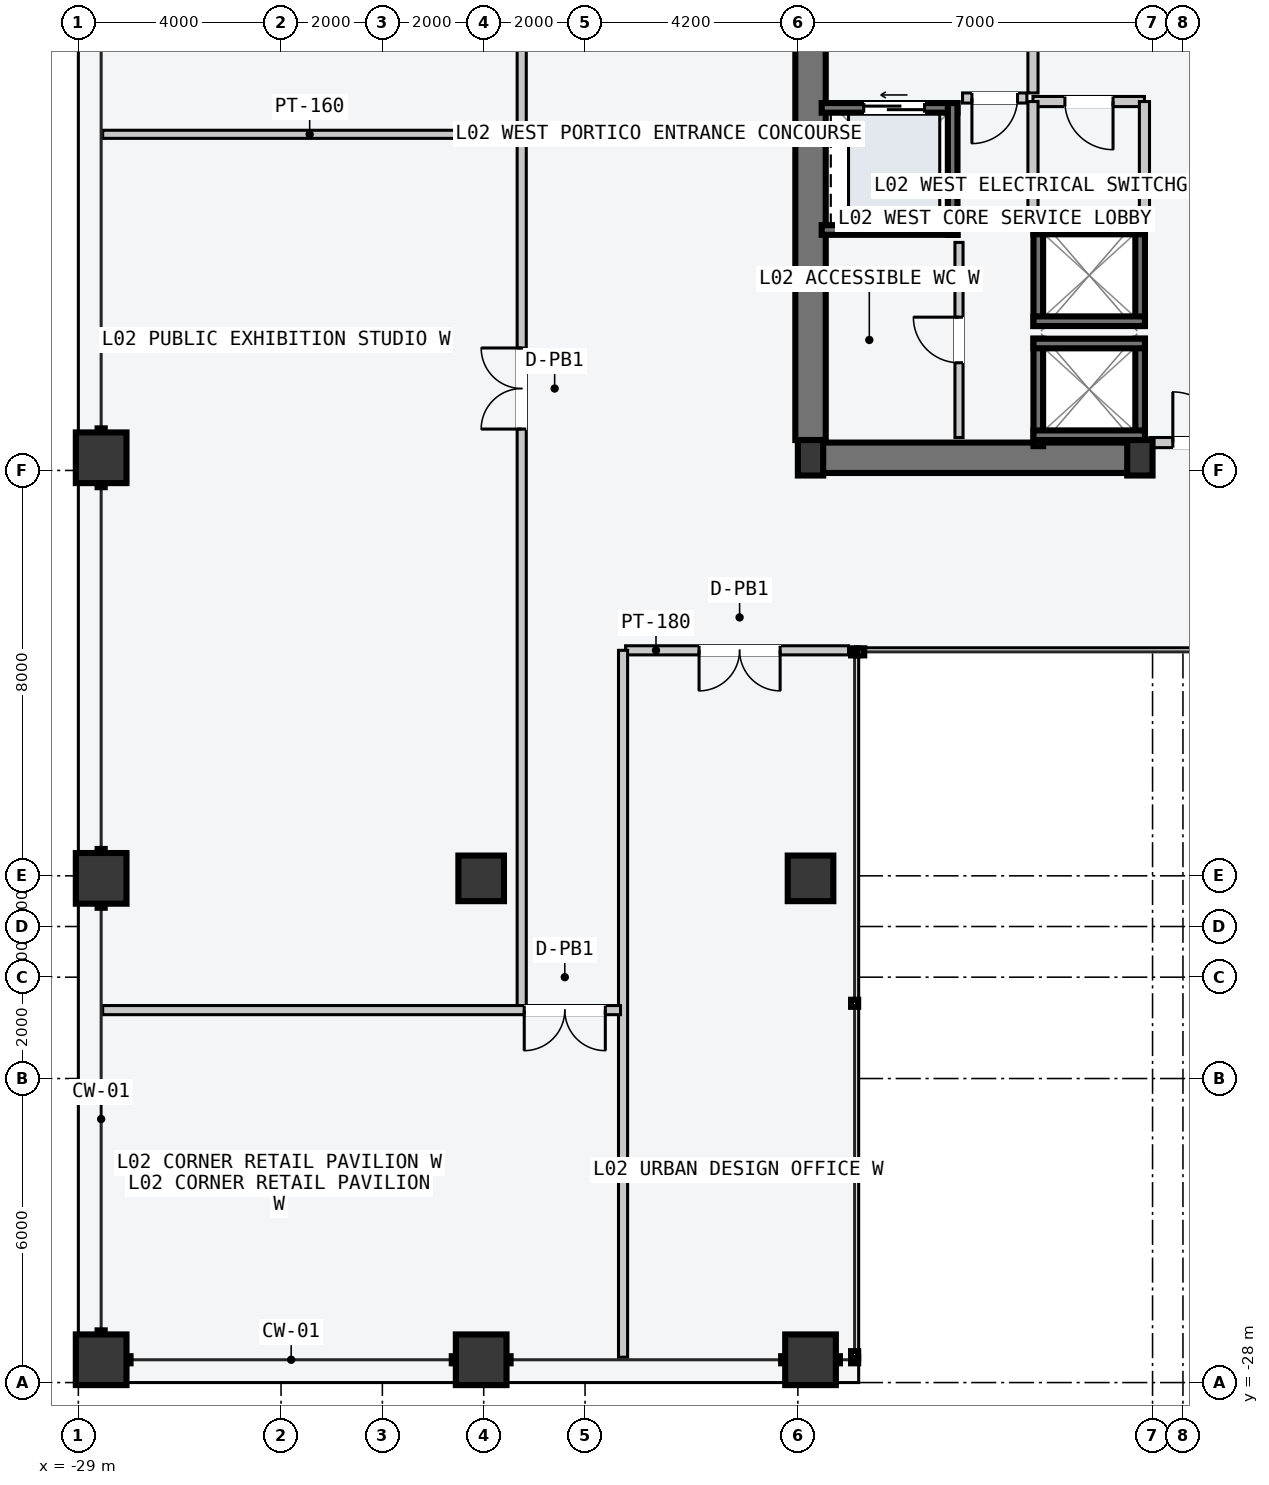
"""IFC4 building model, lengths in metres.
Left out: names, types, materials, properties, quantities, classifications, styles, units other than length and angle.
Written with IfcOpenShell. Run it as: python <this file> out.ifc"""

import sys

from ifc_helpers import new_model, si_unit, direction, frame, frame_2d, origin, origin_2d, place, context, subcontext, project, spatial, rectangle, hollow_rectangle, i_section, extrude, element, fill, save


model = new_model("IFC4")
c1 = context("Model", 3, precision=1e-05, world=origin(), true_north=direction((0.0, 1.0)))
c2 = subcontext(c1, "Body", "Model", "MODEL_VIEW")
j1 = project(units=[si_unit("LENGTHUNIT", "METRE"), si_unit("PLANEANGLEUNIT", "RADIAN")], contexts=[c1])
p1 = place(None, origin())
s1 = spatial("IfcSite", under=j1, at=p1, CompositionType="ELEMENT")
p2 = place(p1, origin())
s2 = spatial("IfcBuilding", under=s1, at=p2, CompositionType="ELEMENT")
p3 = place(p2, frame((0.0, 0.0, 9.6)))
s3 = spatial("IfcBuildingStorey", under=s2, at=p3, CompositionType="ELEMENT", Elevation=9.6)
p4 = place(p3, frame((-14.53, -9.75, -0.22), z_axis=(0.0, 0.0, 1.0), x_axis=(1.0, 0.0, 0.0)))
e1 = element("IfcWall", 1, at=p4, inside=s3, PredefinedType="SHEAR", context=c2, shape_type="SweptSolid", body=[
    extrude(rectangle(XDim=6.46, YDim=0.6, at=frame_2d((3.23, 0.0))), origin(), (0.0, 0.0, 1.0), 4.8),
])
p5 = place(p3, frame((-14.55, -9.4, -0.22), z_axis=(0.0, 0.0, 1.0), x_axis=(0.0, 1.0, 0.0)))
e2 = element("IfcWall", 2, at=p5, inside=s3, PredefinedType="SHEAR", context=c2, shape_type="SweptSolid", body=[
    extrude(rectangle(XDim=9.05, YDim=0.6, at=frame_2d((4.525, 0.0))), origin(), (0.0, 0.0, 1.0), 4.8),
])
for number, where, z_axis, x_axis in (
    (3, (-14.55, -9.75, 0.0), (0.0, 0.0, 1.0), (1.0, 0.0, 0.0)),
    (4, (-8.05, -9.75, 0.0), (0.0, 0.0, 1.0), (1.0, 0.0, 0.0)),
):
    element("IfcColumn", number, at=place(p3, frame(where, z_axis=z_axis, x_axis=x_axis)), inside=s3, PredefinedType="COLUMN", context=c2, shape_type="SweptSolid", body=[
        extrude(i_section(OverallWidth=0.5, OverallDepth=0.7, WebThickness=0.028, FlangeThickness=0.045, at=origin_2d()), origin(), (0.0, 0.0, 1.0), 4.8),
    ])
for number, where, z_axis, x_axis in (
    (5, (-21.05, -18.05, 0.0), (0.0, 0.0, 1.0), (1.0, 0.0, 0.0)),
    (6, (-14.55, -18.05, 0.0), (0.0, 0.0, 1.0), (1.0, 0.0, 0.0)),
):
    element("IfcColumn", number, at=place(p3, frame(where, z_axis=z_axis, x_axis=x_axis)), inside=s3, PredefinedType="COLUMN", context=c2, shape_type="SweptSolid", body=[
        extrude(hollow_rectangle(XDim=0.9, YDim=0.9, WallThickness=0.045, at=origin_2d()), origin(), (0.0, 0.0, 1.0), 4.8),
    ])
for number, where, z_axis, x_axis in (
    (7, (-28.55, -27.55, 0.0), (0.0, 0.0, 1.0), (1.0, 0.0, 0.0)),
    (8, (-21.05, -27.55, 0.0), (0.0, 0.0, 1.0), (1.0, 0.0, 0.0)),
    (9, (-14.55, -27.55, 0.0), (0.0, 0.0, 1.0), (1.0, 0.0, 0.0)),
    (10, (-28.55, -18.05, 0.0), (0.0, 0.0, 1.0), (0.0, 1.0, 0.0)),
    (11, (-28.55, -9.75, 0.0), (0.0, 0.0, 1.0), (0.0, 1.0, 0.0)),
):
    element("IfcColumn", number, at=place(p3, frame(where, z_axis=z_axis, x_axis=x_axis)), inside=s3, PredefinedType="COLUMN", context=c2, shape_type="SweptSolid", body=[
        extrude(hollow_rectangle(XDim=1.0, YDim=1.0, WallThickness=0.05, at=origin_2d()), origin(), (0.0, 0.0, 1.0), 4.8),
    ])
for number, where, z_axis, x_axis in (
    (12, (-8.045, -9.52, -0.22), (0.0, 0.0, 1.0), (0.0, 1.0, 0.0)),
    (13, (-10.055, -9.52, -0.22), (0.0, 0.0, 1.0), (0.0, 1.0, 0.0)),
):
    element("IfcWall", number, at=place(p3, frame(where, z_axis=z_axis, x_axis=x_axis)), inside=s3, PredefinedType="SOLIDWALL", context=c2, shape_type="SweptSolid", body=[
        extrude(rectangle(XDim=2.12, YDim=0.19, at=frame_2d((1.06, 0.0))), origin(), (0.0, 0.0, 1.0), 4.8),
    ])
for number, where, z_axis, x_axis in (
    (14, (-10.15, -7.495, -0.22), (0.0, 0.0, 1.0), (1.0, 0.0, 0.0)),
    (15, (-10.15, -9.305, -0.22), (0.0, 0.0, 1.0), (1.0, 0.0, 0.0)),
):
    element("IfcWall", number, at=place(p3, frame(where, z_axis=z_axis, x_axis=x_axis)), inside=s3, PredefinedType="SOLIDWALL", context=c2, shape_type="SweptSolid", body=[
        extrude(rectangle(XDim=2.2, YDim=0.19, at=frame_2d((1.1, 0.0))), origin(), (0.0, 0.0, 1.0), 4.8),
    ])
for number, where, z_axis, x_axis in (
    (16, (-8.045, -7.15, -0.22), (0.0, 0.0, 1.0), (0.0, 1.0, 0.0)),
    (17, (-10.055, -7.15, -0.22), (0.0, 0.0, 1.0), (0.0, 1.0, 0.0)),
):
    element("IfcWall", number, at=place(p3, frame(where, z_axis=z_axis, x_axis=x_axis)), inside=s3, PredefinedType="SOLIDWALL", context=c2, shape_type="SweptSolid", body=[
        extrude(rectangle(XDim=2.0, YDim=0.19, at=frame_2d((1.0, 0.0))), origin(), (0.0, 0.0, 1.0), 4.8),
    ])
for number, where, z_axis, x_axis in (
    (18, (-10.15, -5.245, -0.22), (0.0, 0.0, 1.0), (1.0, 0.0, 0.0)),
    (19, (-10.15, -7.055, -0.22), (0.0, 0.0, 1.0), (1.0, 0.0, 0.0)),
):
    element("IfcWall", number, at=place(p3, frame(where, z_axis=z_axis, x_axis=x_axis)), inside=s3, PredefinedType="SOLIDWALL", context=c2, shape_type="SweptSolid", body=[
        extrude(rectangle(XDim=2.2, YDim=0.19, at=frame_2d((1.1, 0.0))), origin(), (0.0, 0.0, 1.0), 4.8),
    ])
p6 = place(p3, frame((-14.33, -2.845, -0.22), z_axis=(0.0, 0.0, 1.0), x_axis=(1.0, 0.0, 0.0)))
e20 = element("IfcWall", 20, at=p6, inside=s3, PredefinedType="SOLIDWALL", context=c2, shape_type="SweptSolid", body=[
    extrude(rectangle(XDim=2.68, YDim=0.19, at=frame_2d((1.34, 0.0))), origin(), (0.0, 0.0, 1.0), 4.8),
])
p7 = place(p6, frame((0.83, 0.0, 0.22)))
e21 = element("IfcOpeningElement", 21, at=p7, cuts=e20, PredefinedType="OPENING", context=c2, shape_type="SweptSolid", body=[
    extrude(rectangle(XDim=1.2, YDim=2.2, at=frame_2d((0.6, 1.1))), frame((0.0, 0.105, 0.0), z_axis=(0.0, -1.0, 0.0), x_axis=(1.0, 0.0, 0.0)), (0.0, 0.0, 1.0), 0.21),
])
p8 = place(p3, frame((-14.33, -5.255, -0.22), z_axis=(0.0, 0.0, 1.0), x_axis=(1.0, 0.0, 0.0)))
e22 = element("IfcWall", 22, at=p8, inside=s3, PredefinedType="SOLIDWALL", context=c2, shape_type="SweptSolid", body=[
    extrude(rectangle(XDim=2.68, YDim=0.19, at=frame_2d((1.34, 0.0))), origin(), (0.0, 0.0, 1.0), 4.8),
])
p9 = place(p3, frame((-11.745, -5.35, -0.22), z_axis=(0.0, 0.0, 1.0), x_axis=(0.0, 1.0, 0.0)))
e23 = element("IfcWall", 23, at=p9, inside=s3, PredefinedType="SOLIDWALL", context=c2, shape_type="SweptSolid", body=[
    extrude(rectangle(XDim=2.6, YDim=0.19, at=frame_2d((1.3, 0.0))), origin(), (0.0, 0.0, 1.0), 4.8),
])
p10 = place(p3, frame((-10.16, -2.55, 0.0), z_axis=(0.0, 0.0, 1.0), x_axis=(0.0, 1.0, 0.0)))
e24 = element("IfcWall", 24, at=p10, inside=s3, PredefinedType="PARTITIONING", context=c2, shape_type="SweptSolid", body=[
    extrude(rectangle(XDim=3.4, YDim=0.2, at=frame_2d((1.7, 0.0))), origin(), (0.0, 0.0, 1.0), 4.58),
])
p11 = place(p10, frame((1.3, 0.0, 0.0)))
e25 = element("IfcOpeningElement", 25, at=p11, cuts=e24, PredefinedType="OPENING", context=c2, shape_type="SweptSolid", body=[
    extrude(rectangle(XDim=1.1, YDim=2.15, at=frame_2d((0.55, 1.075))), frame((0.0, 0.11, 0.0), z_axis=(0.0, -1.0, 0.0), x_axis=(1.0, 0.0, 0.0)), (0.0, 0.0, 1.0), 0.22),
])
p12 = place(p3, frame((-10.28, -2.65, 0.0), z_axis=(0.0, 0.0, 1.0), x_axis=(-1.0, 0.0, 0.0)))
e26 = element("IfcWall", 26, at=p12, inside=s3, PredefinedType="PARTITIONING", context=c2, shape_type="SweptSolid", body=[
    extrude(rectangle(XDim=1.27, YDim=0.2, at=frame_2d((0.635, 0.0))), origin(), (0.0, 0.0, 1.0), 4.58),
])
p13 = place(p12, frame((0.185, 0.0, 0.0)))
e27 = element("IfcOpeningElement", 27, at=p13, cuts=e26, PredefinedType="OPENING", context=c2, shape_type="SweptSolid", body=[
    extrude(rectangle(XDim=0.9, YDim=2.15, at=frame_2d((0.45, 1.075))), frame((0.0, 0.11, 0.0), z_axis=(0.0, -1.0, 0.0), x_axis=(1.0, 0.0, 0.0)), (0.0, 0.0, 1.0), 0.22),
])
p14 = place(p3, frame((-7.96, -2.72, 0.0), z_axis=(0.0, 0.0, 1.0), x_axis=(-1.0, 0.0, 0.0)))
e28 = element("IfcWall", 28, at=p14, inside=s3, PredefinedType="PARTITIONING", context=c2, shape_type="SweptSolid", body=[
    extrude(rectangle(XDim=2.2, YDim=0.2, at=frame_2d((1.1, 0.0))), origin(), (0.0, 0.0, 1.0), 4.58),
])
p15 = place(p14, frame((0.62, 0.0, 0.0)))
e29 = element("IfcOpeningElement", 29, at=p15, cuts=e28, PredefinedType="OPENING", context=c2, shape_type="SweptSolid", body=[
    extrude(rectangle(XDim=0.95, YDim=2.1, at=frame_2d((0.475, 1.05))), frame((0.0, 0.11, 0.0), z_axis=(0.0, -1.0, 0.0), x_axis=(1.0, 0.0, 0.0)), (0.0, 0.0, 1.0), 0.22),
])
for number, where, z_axis, x_axis in (
    (30, (-7.96, -5.16, 0.0), (0.0, 0.0, 1.0), (0.0, 1.0, 0.0)),
    (31, (-10.16, -5.16, 0.0), (0.0, 0.0, 1.0), (0.0, 1.0, 0.0)),
):
    element("IfcWall", number, at=place(p3, frame(where, z_axis=z_axis, x_axis=x_axis)), inside=s3, PredefinedType="PARTITIONING", context=c2, shape_type="SweptSolid", body=[
        extrude(rectangle(XDim=2.44, YDim=0.2, at=frame_2d((1.22, 0.0))), origin(), (0.0, 0.0, 1.0), 4.58),
    ])
p16 = place(p3, frame((-11.62, -9.35, 0.0), z_axis=(0.0, 0.0, 1.0), x_axis=(0.0, 1.0, 0.0)))
e32 = element("IfcWall", 32, at=p16, inside=s3, PredefinedType="PARTITIONING", context=c2, shape_type="SweptSolid", body=[
    extrude(rectangle(XDim=3.85, YDim=0.16, at=frame_2d((1.925, 0.0))), origin(), (0.0, 0.0, 1.0), 4.58),
])
p17 = place(p16, frame((1.475, 0.0, 0.0)))
e33 = element("IfcOpeningElement", 33, at=p17, cuts=e32, PredefinedType="OPENING", context=c2, shape_type="SweptSolid", body=[
    extrude(rectangle(XDim=0.9, YDim=2.15, at=frame_2d((0.45, 1.075))), frame((0.0, 0.09, 0.0), z_axis=(0.0, -1.0, 0.0), x_axis=(1.0, 0.0, 0.0)), (0.0, 0.0, 1.0), 0.18),
])
p18 = place(p3, frame((-7.85, -9.45, 0.0), z_axis=(0.0, 0.0, 1.0), x_axis=(1.0, 0.0, 0.0)))
e34 = element("IfcWall", 34, at=p18, inside=s3, PredefinedType="PARTITIONING", context=c2, shape_type="SweptSolid", body=[
    extrude(rectangle(XDim=1.93, YDim=0.2, at=frame_2d((0.965, 0.0))), origin(), (0.0, 0.0, 1.0), 2.63),
])
p19 = place(p18, frame((0.45, 0.0, 0.0)))
e35 = element("IfcOpeningElement", 35, at=p19, cuts=e34, PredefinedType="OPENING", context=c2, shape_type="SweptSolid", body=[
    extrude(rectangle(XDim=1.0, YDim=2.15, at=frame_2d((0.5, 1.075))), frame((0.0, 0.11, 0.0), z_axis=(0.0, -1.0, 0.0), x_axis=(1.0, 0.0, 0.0)), (0.0, 0.0, 1.0), 0.22),
])
p20 = place(p3, frame((-20.35, -3.367, 0.0), z_axis=(0.0, 0.0, 1.0), x_axis=(-1.0, 0.0, 0.0)))
e36 = element("IfcWall", 36, at=p20, inside=s3, PredefinedType="PARTITIONING", context=c2, shape_type="SweptSolid", body=[
    extrude(rectangle(XDim=8.17, YDim=0.16, at=frame_2d((4.085, 0.0))), origin(), (0.0, 0.0, 1.0), 4.08),
])
p21 = place(p3, frame((-20.25, -20.6, 0.0), z_axis=(0.0, 0.0, 1.0), x_axis=(0.0, 1.0, 0.0)))
e37 = element("IfcWall", 37, at=p21, inside=s3, PredefinedType="PARTITIONING", context=c2, shape_type="SweptSolid", body=[
    extrude(rectangle(XDim=37.3, YDim=0.18, at=frame_2d((18.65, 0.0))), origin(), (0.0, 0.0, 1.0), 4.58),
])
p22 = place(p21, frame((11.417, 0.0, 0.0)))
e38 = element("IfcOpeningElement", 38, at=p22, cuts=e37, PredefinedType="OPENING", context=c2, shape_type="SweptSolid", body=[
    extrude(rectangle(XDim=1.6, YDim=2.3, at=frame_2d((0.8, 1.15))), frame((0.0, 0.1, 0.0), z_axis=(0.0, -1.0, 0.0), x_axis=(1.0, 0.0, 0.0)), (0.0, 0.0, 1.0), 0.2),
])
p23 = place(p21, frame((21.45, 0.0, 0.0)))
e39 = element("IfcOpeningElement", 39, at=p23, cuts=e37, PredefinedType="OPENING", context=c2, shape_type="SweptSolid", body=[
    extrude(rectangle(XDim=1.6, YDim=2.3, at=frame_2d((0.8, 1.15))), frame((0.0, 0.1, 0.0), z_axis=(0.0, -1.0, 0.0), x_axis=(1.0, 0.0, 0.0)), (0.0, 0.0, 1.0), 0.2),
])
p24 = place(p21, frame((31.483, 0.0, 0.0)))
e40 = element("IfcOpeningElement", 40, at=p24, cuts=e37, PredefinedType="OPENING", context=c2, shape_type="SweptSolid", body=[
    extrude(rectangle(XDim=1.6, YDim=2.3, at=frame_2d((0.8, 1.15))), frame((0.0, 0.1, 0.0), z_axis=(0.0, -1.0, 0.0), x_axis=(1.0, 0.0, 0.0)), (0.0, 0.0, 1.0), 0.2),
])
p25 = place(p3, frame((-13.8, -13.55, 0.0), z_axis=(0.0, 0.0, 1.0), x_axis=(-1.0, 0.0, 0.0)))
e41 = element("IfcWall", 41, at=p25, inside=s3, PredefinedType="PARTITIONING", context=c2, shape_type="SweptSolid", body=[
    extrude(rectangle(XDim=4.4, YDim=0.18, at=frame_2d((2.2, 0.0))), origin(), (0.0, 0.0, 1.0), 4.58),
])
p26 = place(p25, frame((1.35, 0.0, 0.0)))
e42 = element("IfcOpeningElement", 42, at=p26, cuts=e41, PredefinedType="OPENING", context=c2, shape_type="SweptSolid", body=[
    extrude(rectangle(XDim=1.6, YDim=2.3, at=frame_2d((0.8, 1.15))), frame((0.0, 0.1, 0.0), z_axis=(0.0, -1.0, 0.0), x_axis=(1.0, 0.0, 0.0)), (0.0, 0.0, 1.0), 0.2),
])
p27 = place(p3, frame((-18.25, -27.5, 0.0), z_axis=(0.0, 0.0, 1.0), x_axis=(0.0, 1.0, 0.0)))
e43 = element("IfcWall", 43, at=p27, inside=s3, PredefinedType="PARTITIONING", context=c2, shape_type="SweptSolid", body=[
    extrude(rectangle(XDim=13.95, YDim=0.18, at=frame_2d((6.975, 0.0))), origin(), (0.0, 0.0, 1.0), 4.58),
])
p28 = place(p3, frame((-18.3, -20.65, 0.0), z_axis=(0.0, 0.0, 1.0), x_axis=(-1.0, 0.0, 0.0)))
e44 = element("IfcWall", 44, at=p28, inside=s3, PredefinedType="PARTITIONING", context=c2, shape_type="SweptSolid", body=[
    extrude(rectangle(XDim=10.22, YDim=0.18, at=frame_2d((5.11, 0.0))), origin(), (0.0, 0.0, 1.0), 4.58),
])
p29 = place(p28, frame((0.3, 0.0, 0.0)))
e45 = element("IfcOpeningElement", 45, at=p29, cuts=e44, PredefinedType="OPENING", context=c2, shape_type="SweptSolid", body=[
    extrude(rectangle(XDim=1.6, YDim=2.3, at=frame_2d((0.8, 1.15))), frame((0.0, 0.1, 0.0), z_axis=(0.0, -1.0, 0.0), x_axis=(1.0, 0.0, 0.0)), (0.0, 0.0, 1.0), 0.2),
])
p30 = place(p7, origin())
e46 = element("IfcDoor", 46, at=p30, inside=s3, OperationType="SLIDING_TO_LEFT", PredefinedType="DOOR", context=c2, shape_type="SweptSolid", body=[
    extrude(rectangle(XDim=1.2, YDim=2.2, at=frame_2d((0.6, 1.1))), frame((0.0, 0.025, 0.0), z_axis=(0.0, -1.0, 0.0), x_axis=(1.0, 0.0, 0.0)), (0.0, 0.0, 1.0), 0.05),
])
fill(e21, e46)
p31 = place(p13, origin())
e47 = element("IfcDoor", 47, at=p31, inside=s3, OperationType="SINGLE_SWING_RIGHT", PredefinedType="DOOR", context=c2, shape_type="SweptSolid", body=[
    extrude(rectangle(XDim=0.9, YDim=2.15, at=frame_2d((0.45, 1.075))), frame((0.0, 0.025, 0.0), z_axis=(0.0, -1.0, 0.0), x_axis=(1.0, 0.0, 0.0)), (0.0, 0.0, 1.0), 0.05),
])
fill(e27, e47)
p32 = place(p15, origin())
e48 = element("IfcDoor", 48, at=p32, inside=s3, OperationType="SINGLE_SWING_LEFT", PredefinedType="DOOR", context=c2, shape_type="SweptSolid", body=[
    extrude(rectangle(XDim=0.95, YDim=2.1, at=frame_2d((0.475, 1.05))), frame((0.0, 0.025, 0.0), z_axis=(0.0, -1.0, 0.0), x_axis=(1.0, 0.0, 0.0)), (0.0, 0.0, 1.0), 0.05),
])
fill(e29, e48)
p33 = place(p17, origin())
e49 = element("IfcDoor", 49, at=p33, inside=s3, OperationType="SINGLE_SWING_RIGHT", PredefinedType="DOOR", context=c2, shape_type="SweptSolid", body=[
    extrude(rectangle(XDim=0.9, YDim=2.15, at=frame_2d((0.45, 1.075))), frame((0.0, 0.025, 0.0), z_axis=(0.0, -1.0, 0.0), x_axis=(1.0, 0.0, 0.0)), (0.0, 0.0, 1.0), 0.05),
])
fill(e33, e49)
p34 = place(p19, origin())
e50 = element("IfcDoor", 50, at=p34, inside=s3, OperationType="SINGLE_SWING_LEFT", PredefinedType="DOOR", context=c2, shape_type="SweptSolid", body=[
    extrude(rectangle(XDim=1.0, YDim=2.15, at=frame_2d((0.5, 1.075))), frame((0.0, 0.025, 0.0), z_axis=(0.0, -1.0, 0.0), x_axis=(1.0, 0.0, 0.0)), (0.0, 0.0, 1.0), 0.05),
])
fill(e35, e50)
p35 = place(p22, origin())
e51 = element("IfcDoor", 51, at=p35, inside=s3, OperationType="DOUBLE_DOOR_SINGLE_SWING", PredefinedType="DOOR", context=c2, shape_type="SweptSolid", body=[
    extrude(rectangle(XDim=1.6, YDim=2.3, at=frame_2d((0.8, 1.15))), frame((0.0, 0.025, 0.0), z_axis=(0.0, -1.0, 0.0), x_axis=(1.0, 0.0, 0.0)), (0.0, 0.0, 1.0), 0.05),
])
fill(e38, e51)
p36 = place(p26, origin())
e52 = element("IfcDoor", 52, at=p36, inside=s3, OperationType="DOUBLE_DOOR_SINGLE_SWING", PredefinedType="DOOR", context=c2, shape_type="SweptSolid", body=[
    extrude(rectangle(XDim=1.6, YDim=2.3, at=frame_2d((0.8, 1.15))), frame((0.0, 0.025, 0.0), z_axis=(0.0, -1.0, 0.0), x_axis=(1.0, 0.0, 0.0)), (0.0, 0.0, 1.0), 0.05),
])
fill(e42, e52)
p37 = place(p29, origin())
e53 = element("IfcDoor", 53, at=p37, inside=s3, OperationType="DOUBLE_DOOR_SINGLE_SWING", PredefinedType="DOOR", context=c2, shape_type="SweptSolid", body=[
    extrude(rectangle(XDim=1.6, YDim=2.3, at=frame_2d((0.8, 1.15))), frame((0.0, 0.025, 0.0), z_axis=(0.0, -1.0, 0.0), x_axis=(1.0, 0.0, 0.0)), (0.0, 0.0, 1.0), 0.05),
])
fill(e45, e53)
save(model, sys.argv[1])
